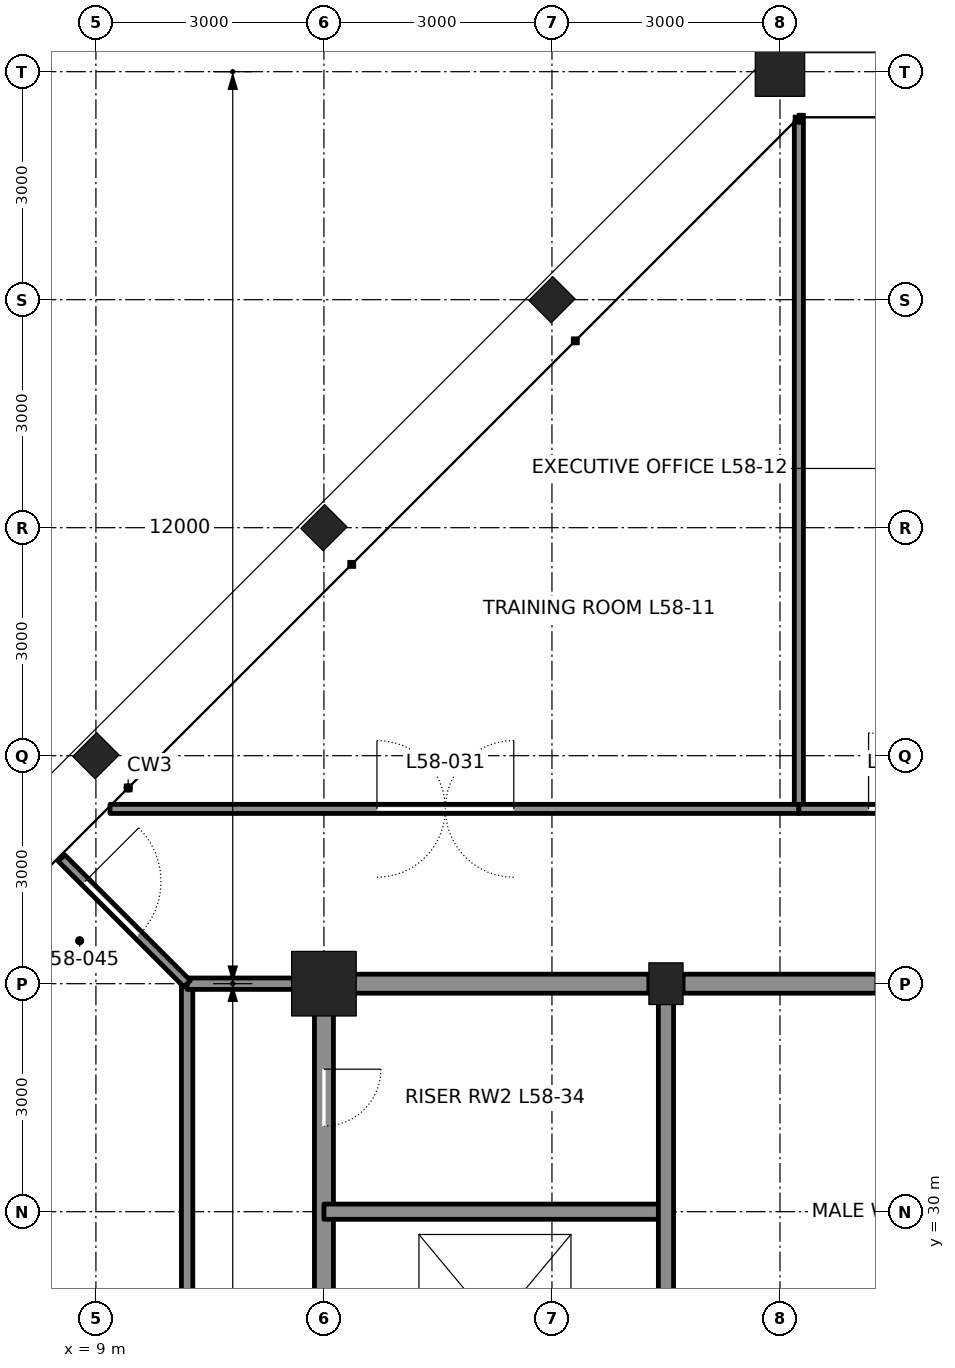
"""IFC4 building model, lengths in metres.
Left out: names, types, materials, properties, quantities, classifications, styles, units other than length and angle.
Written with IfcOpenShell. Run it as: python <this file> out.ifc"""

import sys

from ifc_helpers import new_model, si_unit, direction, frame, frame_2d, origin, origin_2d, place, context, subcontext, project, spatial, rectangle, hollow_rectangle, i_section, extrude, element, fill, save


model = new_model("IFC4")
c1 = context("Model", 3, precision=1e-05, world=origin(), true_north=direction((0.0, 1.0)))
c2 = subcontext(c1, "Body", "Model", "MODEL_VIEW")
j1 = project(units=[si_unit("LENGTHUNIT", "METRE"), si_unit("PLANEANGLEUNIT", "RADIAN")], contexts=[c1])
p1 = place(None, origin())
s1 = spatial("IfcSite", under=j1, at=p1, CompositionType="ELEMENT")
p2 = place(p1, origin())
s2 = spatial("IfcBuilding", under=s1, at=p2, CompositionType="ELEMENT")
p3 = place(p2, frame((0.0, 0.0, 262.2)))
s3 = spatial("IfcBuildingStorey", under=s2, at=p3, CompositionType="ELEMENT", Elevation=262.2)
p4 = place(p3, frame((18.0, 45.0, 0.0), z_axis=(0.0, 0.0, 1.0), x_axis=(0.0, 1.0, 0.0)))
e1 = element("IfcColumn", 1, at=p4, inside=s3, PredefinedType="COLUMN", context=c2, shape_type="SweptSolid", body=[
    extrude(hollow_rectangle(XDim=0.65, YDim=0.65, WallThickness=0.065, at=origin_2d()), origin(), (0.0, 0.0, 1.0), 4.2),
])
for number, where, z_axis, x_axis in (
    (2, (15.0, 42.0, 0.0), (0.0, 0.0, 1.0), (-0.707, 0.707, 0.0)),
    (3, (12.0, 39.0, 0.0), (0.0, 0.0, 1.0), (-0.707, 0.707, 0.0)),
    (4, (9.0, 36.0, 0.0), (0.0, 0.0, 1.0), (-0.707, 0.707, 0.0)),
):
    element("IfcColumn", number, at=place(p3, frame(where, z_axis=z_axis, x_axis=x_axis)), inside=s3, PredefinedType="COLUMN", context=c2, shape_type="SweptSolid", body=[
        extrude(i_section(OverallWidth=0.417, OverallDepth=0.445, WebThickness=0.039, FlangeThickness=0.063, at=origin_2d()), origin(), (0.0, 0.0, 1.0), 4.2),
    ])
p5 = place(p3, frame((12.0, 33.0, 0.0), z_axis=(0.0, 0.0, 1.0), x_axis=(1.0, 0.0, 0.0)))
e5 = element("IfcColumn", 5, at=p5, inside=s3, PredefinedType="COLUMN", context=c2, shape_type="SweptSolid", body=[
    extrude(hollow_rectangle(XDim=0.85, YDim=0.85, WallThickness=0.085, at=origin_2d()), origin(), (0.0, 0.0, 1.0), 4.2),
])
p6 = place(p3, frame((16.5, 33.0, 0.0), z_axis=(0.0, 0.0, 1.0), x_axis=(1.0, 0.0, 0.0)))
e6 = element("IfcColumn", 6, at=p6, inside=s3, PredefinedType="COLUMN", context=c2, shape_type="SweptSolid", body=[
    extrude(i_section(OverallWidth=0.449, OverallDepth=0.549, WebThickness=0.072, FlangeThickness=0.115, at=origin_2d()), origin(), (0.0, 0.0, 1.0), 4.2),
])
p7 = place(p3, frame((12.0, 24.25, 0.0), z_axis=(0.0, 0.0, 1.0), x_axis=(0.0, 1.0, 0.0)))
e7 = element("IfcWall", 7, at=p7, inside=s3, PredefinedType="SOLIDWALL", context=c2, shape_type="SweptSolid", body=[
    extrude(rectangle(XDim=8.5, YDim=0.25, at=frame_2d((4.25, 0.0))), origin(), (0.0, 0.0, 1.0), 3.113),
])
p8 = place(p7, frame((0.65, 0.0, 0.0)))
e8 = element("IfcOpeningElement", 8, at=p8, cuts=e7, PredefinedType="OPENING", context=c2, shape_type="SweptSolid", body=[
    extrude(rectangle(XDim=1.2, YDim=2.1, at=frame_2d((0.6, 1.05))), frame((0.0, 0.135, 0.0), z_axis=(0.0, -1.0, 0.0), x_axis=(1.0, 0.0, 0.0)), (0.0, 0.0, 1.0), 0.27),
])
p9 = place(p7, frame((6.875, 0.0, 0.0)))
e9 = element("IfcOpeningElement", 9, at=p9, cuts=e7, PredefinedType="OPENING", context=c2, shape_type="SweptSolid", body=[
    extrude(rectangle(XDim=0.75, YDim=2.1, at=frame_2d((0.375, 1.05))), frame((0.0, 0.135, 0.0), z_axis=(0.0, -1.0, 0.0), x_axis=(1.0, 0.0, 0.0)), (0.0, 0.0, 1.0), 0.27),
])
p10 = place(p3, frame((12.0, 30.0, 0.0), z_axis=(0.0, 0.0, 1.0), x_axis=(1.0, 0.0, 0.0)))
e10 = element("IfcWall", 10, at=p10, inside=s3, PredefinedType="SOLIDWALL", context=c2, shape_type="SweptSolid", body=[
    extrude(rectangle(XDim=4.5, YDim=0.2, at=frame_2d((2.25, 0.0))), origin(), (0.0, 0.0, 1.0), 4.04),
])
p11 = place(p3, frame((12.25, 33.0, 0.0), z_axis=(0.0, 0.0, 1.0), x_axis=(1.0, 0.0, 0.0)))
e11 = element("IfcWall", 11, at=p11, inside=s3, PredefinedType="SOLIDWALL", context=c2, shape_type="SweptSolid", body=[
    extrude(rectangle(XDim=4.025, YDim=0.25, at=frame_2d((2.013, 0.0))), origin(), (0.0, 0.0, 1.0), 3.182),
])
p12 = place(p3, frame((16.725, 33.0, 0.0), z_axis=(0.0, 0.0, 1.0), x_axis=(1.0, 0.0, 0.0)))
e12 = element("IfcWall", 12, at=p12, inside=s3, PredefinedType="SOLIDWALL", context=c2, shape_type="SweptSolid", body=[
    extrude(rectangle(XDim=2.55, YDim=0.25, at=frame_2d((1.275, 0.0))), origin(), (0.0, 0.0, 1.0), 3.182),
])
p13 = place(p3, frame((16.5, 24.25, 0.0), z_axis=(0.0, 0.0, 1.0), x_axis=(0.0, 1.0, 0.0)))
e13 = element("IfcWall", 13, at=p13, inside=s3, PredefinedType="SOLIDWALL", context=c2, shape_type="SweptSolid", body=[
    extrude(rectangle(XDim=8.5, YDim=0.2, at=frame_2d((4.25, 0.0))), origin(), (0.0, 0.0, 1.0), 3.113),
])
p14 = place(p3, frame((18.249, 44.334, 0.0), z_axis=(0.0, 0.0, 1.0), x_axis=(0.0, -1.0, 0.0)))
e14 = element("IfcWall", 14, at=p14, inside=s3, PredefinedType="PARTITIONING", context=c2, shape_type="SweptSolid", body=[
    extrude(rectangle(XDim=9.034, YDim=0.12, at=frame_2d((4.517, 0.0))), origin(), (0.0, 0.0, 1.0), 4.04),
])
p15 = place(p3, frame((9.186, 35.3, 0.0), z_axis=(0.0, 0.0, 1.0), x_axis=(1.0, 0.0, 0.0)))
e15 = element("IfcWall", 15, at=p15, inside=s3, PredefinedType="PARTITIONING", context=c2, shape_type="SweptSolid", body=[
    extrude(rectangle(XDim=9.063, YDim=0.12, at=frame_2d((4.531, 0.0))), origin(), (0.0, 0.0, 1.0), 4.04),
])
p16 = place(p15, frame((3.512, 0.0, 0.0)))
e16 = element("IfcOpeningElement", 16, at=p16, cuts=e15, PredefinedType="OPENING", context=c2, shape_type="SweptSolid", body=[
    extrude(rectangle(XDim=1.8, YDim=2.4, at=frame_2d((0.9, 1.2))), frame((0.0, 0.07, 0.0), z_axis=(0.0, -1.0, 0.0), x_axis=(1.0, 0.0, 0.0)), (0.0, 0.0, 1.0), 0.14),
])
p17 = place(p3, frame((18.249, 35.3, 0.0), z_axis=(0.0, 0.0, 1.0), x_axis=(1.0, 0.0, 0.0)))
e17 = element("IfcWall", 17, at=p17, inside=s3, PredefinedType="PARTITIONING", context=c2, shape_type="SweptSolid", body=[
    extrude(rectangle(XDim=2.834, YDim=0.12, at=frame_2d((1.417, 0.0))), origin(), (0.0, 0.0, 1.0), 4.04),
])
p18 = place(p17, frame((0.917, 0.0, 0.0)))
e18 = element("IfcOpeningElement", 18, at=p18, cuts=e17, PredefinedType="OPENING", context=c2, shape_type="SweptSolid", body=[
    extrude(rectangle(XDim=1.0, YDim=2.4, at=frame_2d((0.5, 1.2))), frame((0.0, 0.07, 0.0), z_axis=(0.0, -1.0, 0.0), x_axis=(1.0, 0.0, 0.0)), (0.0, 0.0, 1.0), 0.14),
])
p19 = place(p3, frame((10.2, 8.686, 0.0), z_axis=(0.0, 0.0, 1.0), x_axis=(0.0, 1.0, 0.0)))
e19 = element("IfcWall", 19, at=p19, inside=s3, PredefinedType="PARTITIONING", context=c2, shape_type="SweptSolid", body=[
    extrude(rectangle(XDim=24.314, YDim=0.15, at=frame_2d((12.157, 0.0))), origin(), (0.0, 0.0, 1.0), 4.04),
])
p20 = place(p19, frame((11.5, 0.0, 0.0)))
e20 = element("IfcOpeningElement", 20, at=p20, cuts=e19, PredefinedType="OPENING", context=c2, shape_type="SweptSolid", body=[
    extrude(rectangle(XDim=1.0, YDim=2.4, at=frame_2d((0.5, 1.2))), frame((0.0, 0.085, 0.0), z_axis=(0.0, -1.0, 0.0), x_axis=(1.0, 0.0, 0.0)), (0.0, 0.0, 1.0), 0.17),
])
p21 = place(p3, frame((10.2, 33.0, 0.0), z_axis=(0.0, 0.0, 1.0), x_axis=(1.0, 0.0, 0.0)))
e21 = element("IfcWall", 21, at=p21, inside=s3, PredefinedType="PARTITIONING", context=c2, shape_type="SweptSolid", body=[
    extrude(rectangle(XDim=1.8, YDim=0.15, at=frame_2d((0.9, 0.0))), origin(), (0.0, 0.0, 1.0), 3.271),
])
p22 = place(p3, frame((10.2, 33.0, 0.0), z_axis=(0.0, 0.0, 1.0), x_axis=(-0.707106781187, 0.707106781187, 0.0)))
e22 = element("IfcWall", 22, at=p22, inside=s3, PredefinedType="PARTITIONING", context=c2, shape_type="SweptSolid", body=[
    extrude(rectangle(XDim=2.338, YDim=0.12, at=frame_2d((1.169, 0.0))), origin(), (0.0, 0.0, 1.0), 4.04),
])
p23 = place(p22, frame((0.9, 0.0, 0.0)))
e23 = element("IfcOpeningElement", 23, at=p23, cuts=e22, PredefinedType="OPENING", context=c2, shape_type="SweptSolid", body=[
    extrude(rectangle(XDim=1.0, YDim=2.4, at=frame_2d((0.5, 1.2))), frame((0.0, 0.07, 0.0), z_axis=(0.0, -1.0, 0.0), x_axis=(1.0, 0.0, 0.0)), (0.0, 0.0, 1.0), 0.14),
])
p24 = place(p9, frame((0.75, 0.0, 0.0), z_axis=(0.0, 0.0, 1.0), x_axis=(-1.0, 0.0, 0.0)))
e24 = element("IfcDoor", 24, at=p24, inside=s3, OperationType="SINGLE_SWING_LEFT", PredefinedType="DOOR", context=c2, shape_type="SweptSolid", body=[
    extrude(rectangle(XDim=0.75, YDim=2.1, at=frame_2d((0.375, 1.05))), frame((0.0, 0.025, 0.0), z_axis=(0.0, -1.0, 0.0), x_axis=(1.0, 0.0, 0.0)), (0.0, 0.0, 1.0), 0.05),
])
fill(e9, e24)
p25 = place(p16, origin())
e25 = element("IfcDoor", 25, at=p25, inside=s3, OperationType="DOUBLE_DOOR_DOUBLE_SWING", PredefinedType="DOOR", context=c2, shape_type="SweptSolid", body=[
    extrude(rectangle(XDim=1.8, YDim=2.4, at=frame_2d((0.9, 1.2))), frame((0.0, 0.025, 0.0), z_axis=(0.0, -1.0, 0.0), x_axis=(1.0, 0.0, 0.0)), (0.0, 0.0, 1.0), 0.05),
])
fill(e16, e25)
p26 = place(p18, origin())
e26 = element("IfcDoor", 26, at=p26, inside=s3, OperationType="SINGLE_SWING_LEFT", PredefinedType="DOOR", context=c2, shape_type="SweptSolid", body=[
    extrude(rectangle(XDim=1.0, YDim=2.4, at=frame_2d((0.5, 1.2))), frame((0.0, 0.025, 0.0), z_axis=(0.0, -1.0, 0.0), x_axis=(1.0, 0.0, 0.0)), (0.0, 0.0, 1.0), 0.05),
])
fill(e18, e26)
p27 = place(p23, frame((1.0, 0.0, 0.0), z_axis=(0.0, 0.0, 1.0), x_axis=(-1.0, 0.0, 0.0)))
e27 = element("IfcDoor", 27, at=p27, inside=s3, OperationType="SINGLE_SWING_LEFT", PredefinedType="DOOR", context=c2, shape_type="SweptSolid", body=[
    extrude(rectangle(XDim=1.0, YDim=2.4, at=frame_2d((0.5, 1.2))), frame((0.0, 0.025, 0.0), z_axis=(0.0, -1.0, 0.0), x_axis=(1.0, 0.0, 0.0)), (0.0, 0.0, 1.0), 0.05),
])
fill(e23, e27)
save(model, sys.argv[1])
